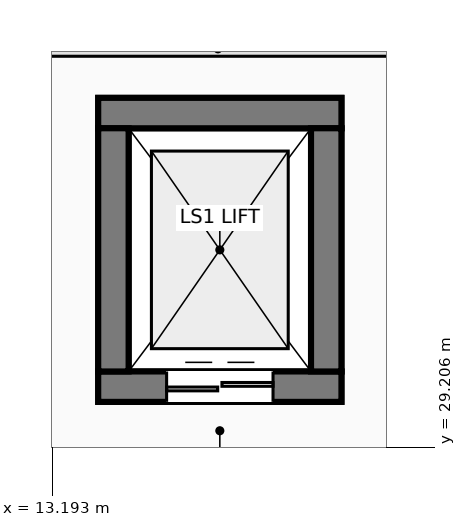
"""IFC4 building model, lengths in metres.
Left out: names, types, materials, properties, quantities, classifications, styles, units other than length and angle.
Written with IfcOpenShell. Run it as: python <this file> out.ifc"""

import sys

from ifc_helpers import new_model, si_unit, direction, frame, frame_2d, origin, place, context, subcontext, project, spatial, rectangle, extrude, element, fill, save


model = new_model("IFC4")
c1 = context("Model", 3, precision=1e-05, world=origin(), true_north=direction((0.0, 1.0)))
c2 = subcontext(c1, "Body", "Model", "MODEL_VIEW")
j1 = project(units=[si_unit("LENGTHUNIT", "METRE"), si_unit("PLANEANGLEUNIT", "RADIAN")], contexts=[c1])
p1 = place(None, origin())
s1 = spatial("IfcSite", under=j1, at=p1, CompositionType="ELEMENT")
p2 = place(p1, origin())
s2 = spatial("IfcBuilding", under=s1, at=p2, CompositionType="ELEMENT")
p3 = place(p2, frame((0.0, 0.0, 22.2)))
s3 = spatial("IfcBuildingStorey", under=s2, at=p3, CompositionType="ELEMENT", Elevation=22.2)
p4 = place(p3, frame((13.8, 30.0, 0.0), z_axis=(0.0, 0.0, 1.0), x_axis=(1.0, 0.0, 0.0)))
e1 = element("IfcWall", 1, at=p4, inside=s3, PredefinedType="SHEAR", context=c2, shape_type="SweptSolid", body=[
    extrude(rectangle(XDim=3.2, YDim=0.4, at=frame_2d((1.6, 0.0))), origin(), (0.0, 0.0, 1.0), 4.2),
])
p5 = place(p4, frame((0.9, 0.0, 0.0)))
e2 = element("IfcOpeningElement", 2, at=p5, cuts=e1, PredefinedType="OPENING", context=c2, shape_type="SweptSolid", body=[
    extrude(rectangle(XDim=1.4, YDim=2.3, at=frame_2d((0.7, 1.15))), frame((0.0, 0.21, 0.0), z_axis=(0.0, -1.0, 0.0), x_axis=(1.0, 0.0, 0.0)), (0.0, 0.0, 1.0), 0.42),
])
for number, where, z_axis, x_axis in (
    (3, (17.0, 33.6, 0.0), (0.0, 0.0, 1.0), (-1.0, 0.0, 0.0)),
    (4, (14.0, 30.2, 0.0), (0.0, 0.0, 1.0), (0.0, 1.0, 0.0)),
    (5, (16.8, 33.4, 0.0), (0.0, 0.0, 1.0), (0.0, -1.0, 0.0)),
):
    element("IfcWall", number, at=place(p3, frame(where, z_axis=z_axis, x_axis=x_axis)), inside=s3, PredefinedType="SHEAR", context=c2, shape_type="SweptSolid", body=[
        extrude(rectangle(XDim=3.2, YDim=0.4, at=frame_2d((1.6, 0.0))), origin(), (0.0, 0.0, 1.0), 4.2),
    ])
for number, where, z_axis, x_axis in (
    (6, (13.8, 30.0, 4.2), (0.0, 0.0, 1.0), (1.0, 0.0, 0.0)),
    (7, (17.0, 33.6, 4.2), (0.0, 0.0, 1.0), (-1.0, 0.0, 0.0)),
    (8, (14.0, 30.2, 4.2), (0.0, 0.0, 1.0), (0.0, 1.0, 0.0)),
    (9, (16.8, 33.4, 4.2), (0.0, 0.0, 1.0), (0.0, -1.0, 0.0)),
):
    element("IfcWall", number, at=place(p3, frame(where, z_axis=z_axis, x_axis=x_axis)), inside=s3, PredefinedType="SHEAR", context=c2, shape_type="SweptSolid", body=[
        extrude(rectangle(XDim=3.2, YDim=0.4, at=frame_2d((1.6, 0.0))), origin(), (0.0, 0.0, 1.0), 3.15),
    ])
p6 = place(p5, origin())
e10 = element("IfcDoor", 10, at=p6, inside=s3, OperationType="DOUBLE_DOOR_SLIDING", PredefinedType="DOOR", context=c2, shape_type="SweptSolid", body=[
    extrude(rectangle(XDim=1.4, YDim=2.3, at=frame_2d((0.7, 1.15))), frame((0.0, 0.025, 0.0), z_axis=(0.0, -1.0, 0.0), x_axis=(1.0, 0.0, 0.0)), (0.0, 0.0, 1.0), 0.05),
])
fill(e2, e10)
save(model, sys.argv[1])
